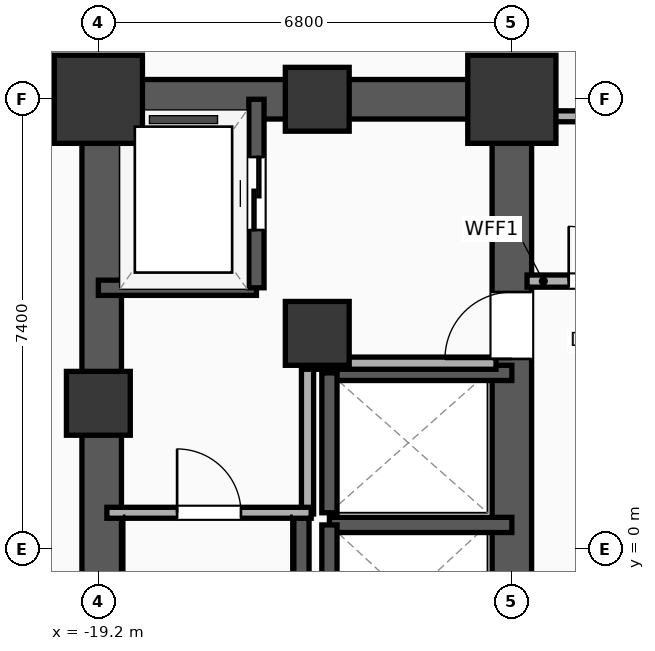
"""IFC4 building model, lengths in metres.
Left out: names, types, materials, properties, quantities, classifications, styles, units other than length and angle.
Written with IfcOpenShell. Run it as: python <this file> out.ifc"""

import sys

from ifc_helpers import new_model, si_unit, direction, frame, frame_2d, origin, origin_2d, place, context, subcontext, project, spatial, rectangle, extrude, element, fill, save


model = new_model("IFC4")
c1 = context("Model", 3, precision=1e-05, world=origin(), true_north=direction((0.0, 1.0)))
c2 = subcontext(c1, "Body", "Model", "MODEL_VIEW")
j1 = project(units=[si_unit("LENGTHUNIT", "METRE"), si_unit("PLANEANGLEUNIT", "RADIAN")], contexts=[c1])
p1 = place(None, origin())
s1 = spatial("IfcSite", under=j1, at=p1, CompositionType="ELEMENT")
p2 = place(p1, origin())
s2 = spatial("IfcBuilding", under=s1, at=p2, CompositionType="ELEMENT")
p3 = place(p2, frame((0.0, 0.0, 41.6)))
s3 = spatial("IfcBuildingStorey", under=s2, at=p3, CompositionType="ELEMENT", Elevation=41.6)
p4 = place(p3, frame((-19.2, 2.4, 0.0), z_axis=(0.0, 0.0, 1.0), x_axis=(1.0, 0.0, 0.0)))
e1 = element("IfcColumn", 1, at=p4, inside=s3, PredefinedType="COLUMN", context=c2, shape_type="SweptSolid", body=[
    extrude(rectangle(XDim=1.05, YDim=1.05, at=origin_2d()), origin(), (0.0, 0.0, 1.0), 3.9),
])
p5 = place(p3, frame((-19.2, 7.4, 0.0), z_axis=(0.0, 0.0, 1.0), x_axis=(1.0, 0.0, 0.0)))
e2 = element("IfcColumn", 2, at=p5, inside=s3, PredefinedType="COLUMN", context=c2, shape_type="SweptSolid", body=[
    extrude(rectangle(XDim=1.45, YDim=1.45, at=origin_2d()), origin(), (0.0, 0.0, 1.0), 3.9),
])
for number, where, z_axis, x_axis in (
    (3, (-15.6, 7.4, 0.0), (0.0, 0.0, 1.0), (1.0, 0.0, 0.0)),
    (4, (-15.6, 3.55, 0.0), (0.0, 0.0, 1.0), (1.0, 0.0, 0.0)),
):
    element("IfcColumn", number, at=place(p3, frame(where, z_axis=z_axis, x_axis=x_axis)), inside=s3, PredefinedType="COLUMN", context=c2, shape_type="SweptSolid", body=[
        extrude(rectangle(XDim=1.05, YDim=1.05, at=origin_2d()), origin(), (0.0, 0.0, 1.0), 3.9),
    ])
p6 = place(p3, frame((-12.4, 7.4, 0.0), z_axis=(0.0, 0.0, 1.0), x_axis=(1.0, 0.0, 0.0)))
e5 = element("IfcColumn", 5, at=p6, inside=s3, PredefinedType="COLUMN", context=c2, shape_type="SweptSolid", body=[
    extrude(rectangle(XDim=1.45, YDim=1.45, at=origin_2d()), origin(), (0.0, 0.0, 1.0), 3.9),
])
p7 = place(p3, frame((-19.525, 7.4, 0.0), z_axis=(0.0, 0.0, 1.0), x_axis=(1.0, 0.0, 0.0)))
e6 = element("IfcWall", 6, at=p7, inside=s3, PredefinedType="SHEAR", context=c2, shape_type="SweptSolid", body=[
    extrude(rectangle(XDim=7.45, YDim=0.65, at=frame_2d((3.725, 0.0))), origin(), (0.0, 0.0, 1.0), 3.65),
])
p8 = place(p3, frame((-19.145, -7.4, 0.0), z_axis=(0.0, 0.0, 1.0), x_axis=(0.0, 1.0, 0.0)))
e7 = element("IfcWall", 7, at=p8, inside=s3, PredefinedType="SHEAR", context=c2, shape_type="SweptSolid", body=[
    extrude(rectangle(XDim=14.8, YDim=0.65, at=frame_2d((7.4, 0.0))), origin(), (0.0, 0.0, 1.0), 3.65),
])
p9 = place(p3, frame((-12.4, -7.4, 0.0), z_axis=(0.0, 0.0, 1.0), x_axis=(0.0, 1.0, 0.0)))
e8 = element("IfcWall", 8, at=p9, inside=s3, PredefinedType="SHEAR", context=c2, shape_type="SweptSolid", body=[
    extrude(rectangle(XDim=14.8, YDim=0.65, at=frame_2d((7.4, 0.0))), origin(), (0.0, 0.0, 1.0), 3.65),
])
p10 = place(p9, frame((0.85, 0.0, 0.0)))
e9 = element("IfcOpeningElement", 9, at=p10, cuts=e8, PredefinedType="OPENING", context=c2, shape_type="SweptSolid", body=[
    extrude(rectangle(XDim=1.1, YDim=2.05, at=frame_2d((0.55, 1.025))), frame((0.0, 0.335, 0.0), z_axis=(0.0, -1.0, 0.0), x_axis=(1.0, 0.0, 0.0)), (0.0, 0.0, 1.0), 0.67),
])
p11 = place(p9, frame((3.45, 0.0, 0.0)))
e10 = element("IfcOpeningElement", 10, at=p11, cuts=e8, PredefinedType="OPENING", context=c2, shape_type="SweptSolid", body=[
    extrude(rectangle(XDim=1.1, YDim=2.05, at=frame_2d((0.55, 1.025))), frame((0.0, 0.335, 0.0), z_axis=(0.0, -1.0, 0.0), x_axis=(1.0, 0.0, 0.0)), (0.0, 0.0, 1.0), 0.67),
])
p12 = place(p9, frame((10.53, 0.0, 0.0)))
e11 = element("IfcOpeningElement", 11, at=p12, cuts=e8, PredefinedType="OPENING", context=c2, shape_type="SweptSolid", body=[
    extrude(rectangle(XDim=1.1, YDim=2.05, at=frame_2d((0.55, 1.025))), frame((0.0, 0.335, 0.0), z_axis=(0.0, -1.0, 0.0), x_axis=(1.0, 0.0, 0.0)), (0.0, 0.0, 1.0), 0.67),
])
p13 = place(p3, frame((-15.86, -7.085, 0.0), z_axis=(0.0, 0.0, 1.0), x_axis=(0.0, 1.0, 0.0)))
e12 = element("IfcWall", 12, at=p13, inside=s3, PredefinedType="SOLIDWALL", context=c2, shape_type="SweptSolid", body=[
    extrude(rectangle(XDim=7.685, YDim=0.25, at=frame_2d((3.843, 0.0))), origin(), (0.0, 0.0, 1.0), 3.65),
])
p14 = place(p3, frame((-19.2, 4.3, 0.0), z_axis=(0.0, 0.0, 1.0), x_axis=(1.0, 0.0, 0.0)))
e13 = element("IfcWall", 13, at=p14, inside=s3, PredefinedType="SOLIDWALL", context=c2, shape_type="SweptSolid", body=[
    extrude(rectangle(XDim=2.6, YDim=0.25, at=frame_2d((1.3, 0.0))), origin(), (0.0, 0.0, 1.0), 3.65),
])
p15 = place(p3, frame((-16.6, 4.3, 0.0), z_axis=(0.0, 0.0, 1.0), x_axis=(0.0, 1.0, 0.0)))
e14 = element("IfcWall", 14, at=p15, inside=s3, PredefinedType="SOLIDWALL", context=c2, shape_type="SweptSolid", body=[
    extrude(rectangle(XDim=3.1, YDim=0.25, at=frame_2d((1.55, 0.0))), origin(), (0.0, 0.0, 1.0), 3.65),
])
p16 = place(p15, frame((0.95, 0.0, 0.0)))
e15 = element("IfcOpeningElement", 15, at=p16, cuts=e14, PredefinedType="OPENING", context=c2, shape_type="SweptSolid", body=[
    extrude(rectangle(XDim=1.2, YDim=2.05, at=frame_2d((0.6, 1.025))), frame((0.0, 0.135, 0.0), z_axis=(0.0, -1.0, 0.0), x_axis=(1.0, 0.0, 0.0)), (0.0, 0.0, 1.0), 0.27),
])
p17 = place(p3, frame((-12.4, 0.4, 0.0), z_axis=(0.0, 0.0, 1.0), x_axis=(-1.0, 0.0, 0.0)))
e16 = element("IfcWall", 16, at=p17, inside=s3, PredefinedType="SOLIDWALL", context=c2, shape_type="SweptSolid", body=[
    extrude(rectangle(XDim=3.0, YDim=0.25, at=frame_2d((1.5, 0.0))), origin(), (0.0, 0.0, 1.0), 3.65),
])
p18 = place(p3, frame((-15.4, 0.4, 0.0), z_axis=(0.0, 0.0, 1.0), x_axis=(0.0, -1.0, 0.0)))
e17 = element("IfcWall", 17, at=p18, inside=s3, PredefinedType="SOLIDWALL", context=c2, shape_type="SweptSolid", body=[
    extrude(rectangle(XDim=2.4, YDim=0.25, at=frame_2d((1.2, 0.0))), origin(), (0.0, 0.0, 1.0), 3.65),
])
p19 = place(p3, frame((-12.4, 2.9, 0.0), z_axis=(0.0, 0.0, 1.0), x_axis=(-1.0, 0.0, 0.0)))
e18 = element("IfcWall", 18, at=p19, inside=s3, PredefinedType="SOLIDWALL", context=c2, shape_type="SweptSolid", body=[
    extrude(rectangle(XDim=3.0, YDim=0.25, at=frame_2d((1.5, 0.0))), origin(), (0.0, 0.0, 1.0), 3.65),
])
p20 = place(p3, frame((-15.4, 2.9, 0.0), z_axis=(0.0, 0.0, 1.0), x_axis=(0.0, -1.0, 0.0)))
e19 = element("IfcWall", 19, at=p20, inside=s3, PredefinedType="SOLIDWALL", context=c2, shape_type="SweptSolid", body=[
    extrude(rectangle(XDim=2.3, YDim=0.25, at=frame_2d((1.15, 0.0))), origin(), (0.0, 0.0, 1.0), 3.65),
])
p21 = place(p3, frame((-15.76, 0.58, 0.0), z_axis=(0.0, 0.0, 1.0), x_axis=(0.0, 1.0, 0.0)))
e20 = element("IfcWall", 20, at=p21, inside=s3, PredefinedType="PARTITIONING", context=c2, shape_type="SweptSolid", body=[
    extrude(rectangle(XDim=2.52, YDim=0.2, at=frame_2d((1.26, 0.0))), origin(), (0.0, 0.0, 1.0), 3.65),
])
p22 = place(p3, frame((-15.82, 3.06, 0.0), z_axis=(0.0, 0.0, 1.0), x_axis=(1.0, 0.0, 0.0)))
e21 = element("IfcWall", 21, at=p22, inside=s3, PredefinedType="PARTITIONING", context=c2, shape_type="SweptSolid", body=[
    extrude(rectangle(XDim=3.16, YDim=0.2, at=frame_2d((1.58, 0.0))), origin(), (0.0, 0.0, 1.0), 3.65),
])
p23 = place(p3, frame((-19.06, 0.6, 0.0), z_axis=(0.0, 0.0, 1.0), x_axis=(1.0, 0.0, 0.0)))
e22 = element("IfcWall", 22, at=p23, inside=s3, PredefinedType="PARTITIONING", context=c2, shape_type="SweptSolid", body=[
    extrude(rectangle(XDim=3.36, YDim=0.18, at=frame_2d((1.68, 0.0))), origin(), (0.0, 0.0, 1.0), 3.65),
])
p24 = place(p23, frame((1.155, 0.0, 0.0)))
e23 = element("IfcOpeningElement", 23, at=p24, cuts=e22, PredefinedType="OPENING", context=c2, shape_type="SweptSolid", body=[
    extrude(rectangle(XDim=1.05, YDim=2.05, at=frame_2d((0.525, 1.025))), frame((0.0, 0.1, 0.0), z_axis=(0.0, -1.0, 0.0), x_axis=(1.0, 0.0, 0.0)), (0.0, 0.0, 1.0), 0.2),
])
p25 = place(p3, frame((-12.15, 4.41, 0.0), z_axis=(0.0, 0.0, 1.0), x_axis=(1.0, 0.0, 0.0)))
e24 = element("IfcWall", 24, at=p25, inside=s3, PredefinedType="PARTITIONING", context=c2, shape_type="SweptSolid", body=[
    extrude(rectangle(XDim=2.27, YDim=0.2, at=frame_2d((1.135, 0.0))), origin(), (0.0, 0.0, 1.0), 3.65),
])
p26 = place(p25, frame((0.685, 0.0, 0.0)))
e25 = element("IfcOpeningElement", 25, at=p26, cuts=e24, PredefinedType="OPENING", context=c2, shape_type="SweptSolid", body=[
    extrude(rectangle(XDim=0.9, YDim=2.05, at=frame_2d((0.45, 1.025))), frame((0.0, 0.11, 0.0), z_axis=(0.0, -1.0, 0.0), x_axis=(1.0, 0.0, 0.0)), (0.0, 0.0, 1.0), 0.22),
])
p27 = place(p3, frame((-12.15, 7.12, 0.0), z_axis=(0.0, 0.0, 1.0), x_axis=(1.0, 0.0, 0.0)))
e26 = element("IfcWall", 26, at=p27, inside=s3, PredefinedType="PARTITIONING", context=c2, shape_type="SweptSolid", body=[
    extrude(rectangle(XDim=2.27, YDim=0.18, at=frame_2d((1.135, 0.0))), origin(), (0.0, 0.0, 1.0), 2.94),
])
p28 = place(p16, origin())
e27 = element("IfcDoor", 27, at=p28, inside=s3, OperationType="SLIDING_TO_LEFT", PredefinedType="DOOR", context=c2, shape_type="SweptSolid", body=[
    extrude(rectangle(XDim=1.2, YDim=2.05, at=frame_2d((0.6, 1.025))), frame((0.0, 0.025, 0.0), z_axis=(0.0, -1.0, 0.0), x_axis=(1.0, 0.0, 0.0)), (0.0, 0.0, 1.0), 0.05),
])
fill(e15, e27)
p29 = place(p24, origin())
e28 = element("IfcDoor", 28, at=p29, inside=s3, OperationType="SINGLE_SWING_LEFT", PredefinedType="DOOR", context=c2, shape_type="SweptSolid", body=[
    extrude(rectangle(XDim=1.05, YDim=2.05, at=frame_2d((0.525, 1.025))), frame((0.0, 0.025, 0.0), z_axis=(0.0, -1.0, 0.0), x_axis=(1.0, 0.0, 0.0)), (0.0, 0.0, 1.0), 0.05),
])
fill(e23, e28)
p30 = place(p26, origin())
e29 = element("IfcDoor", 29, at=p30, inside=s3, OperationType="SINGLE_SWING_LEFT", PredefinedType="DOOR", context=c2, shape_type="SweptSolid", body=[
    extrude(rectangle(XDim=0.9, YDim=2.05, at=frame_2d((0.45, 1.025))), frame((0.0, 0.025, 0.0), z_axis=(0.0, -1.0, 0.0), x_axis=(1.0, 0.0, 0.0)), (0.0, 0.0, 1.0), 0.05),
])
fill(e25, e29)
p31 = place(p12, origin())
e30 = element("IfcDoor", 30, at=p31, inside=s3, OperationType="SINGLE_SWING_LEFT", PredefinedType="DOOR", context=c2, shape_type="SweptSolid", body=[
    extrude(rectangle(XDim=1.1, YDim=2.05, at=frame_2d((0.55, 1.025))), frame((0.0, 0.025, 0.0), z_axis=(0.0, -1.0, 0.0), x_axis=(1.0, 0.0, 0.0)), (0.0, 0.0, 1.0), 0.05),
])
fill(e11, e30)
save(model, sys.argv[1])
